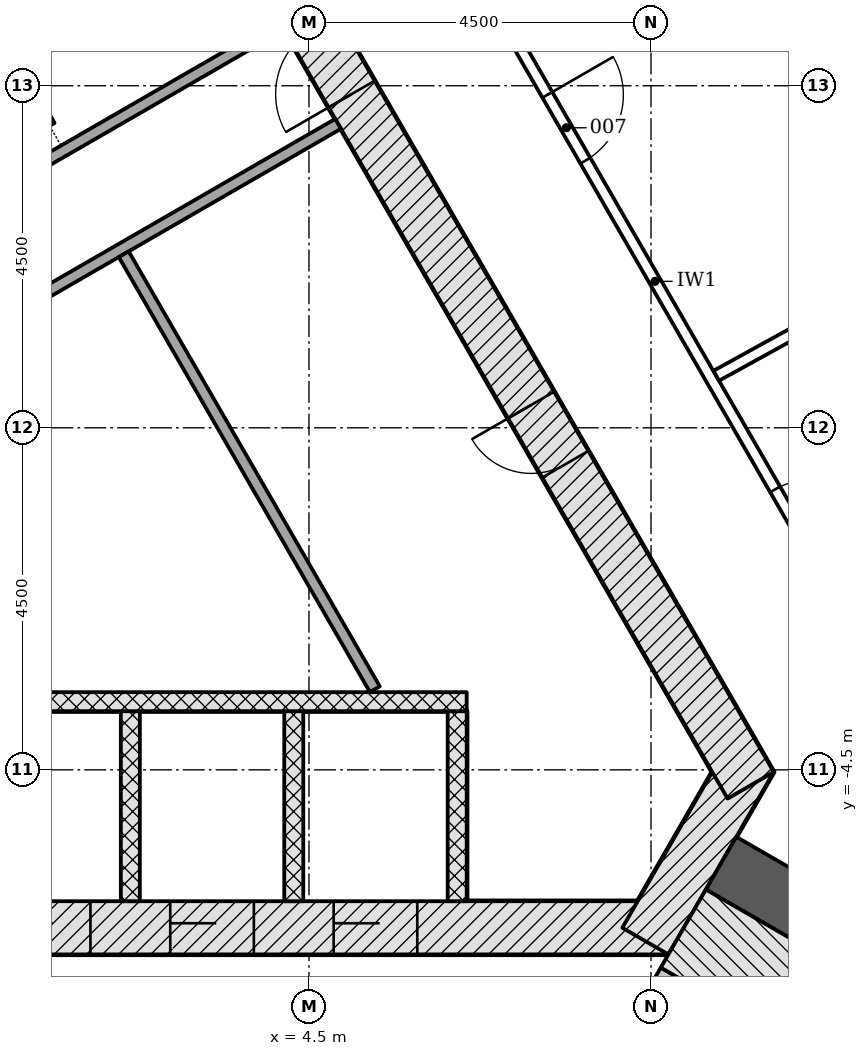
"""IFC4 building model, lengths in metres.
Left out: names, types, materials, properties, quantities, classifications, styles, units other than length and angle.
Written with IfcOpenShell. Run it as: python <this file> out.ifc"""

import sys

from ifc_helpers import new_model, si_unit, direction, frame, frame_2d, origin, place, context, subcontext, project, spatial, rectangle, extrude, element, fill, save


model = new_model("IFC4")
c1 = context("Model", 3, precision=1e-05, world=origin(), true_north=direction((0.0, 1.0)))
c2 = subcontext(c1, "Body", "Model", "MODEL_VIEW")
j1 = project(units=[si_unit("LENGTHUNIT", "METRE"), si_unit("PLANEANGLEUNIT", "RADIAN")], contexts=[c1])
p1 = place(None, origin())
s1 = spatial("IfcSite", under=j1, at=p1, CompositionType="ELEMENT")
p2 = place(p1, origin())
s2 = spatial("IfcBuilding", under=s1, at=p2, CompositionType="ELEMENT")
p3 = place(p2, frame((0.0, 0.0, 105.9)))
s3 = spatial("IfcBuildingStorey", under=s2, at=p3, CompositionType="ELEMENT", Elevation=105.9)
p4 = place(p3, frame((-9.229, -6.578, -0.2), z_axis=(0.0, 0.0, 1.0), x_axis=(1.0, 0.0, 0.0)))
e1 = element("IfcWall", 1, at=p4, inside=s3, PredefinedType="SHEAR", context=c2, shape_type="SweptSolid", body=[
    extrude(rectangle(XDim=18.458, YDim=0.7, at=frame_2d((9.229, 0.0))), origin(), (0.0, 0.0, 1.0), 3.6),
])
p5 = place(p4, frame((3.304, 0.0, 0.2)))
e2 = element("IfcOpeningElement", 2, at=p5, cuts=e1, PredefinedType="OPENING", context=c2, shape_type="SweptSolid", body=[
    extrude(rectangle(XDim=1.1, YDim=2.1, at=frame_2d((0.55, 1.05))), frame((0.0, 0.36, 0.0), z_axis=(0.0, -1.0, 0.0), x_axis=(1.0, 0.0, 0.0)), (0.0, 0.0, 1.0), 0.72),
])
p6 = place(p4, frame((5.454, 0.0, 0.2)))
e3 = element("IfcOpeningElement", 3, at=p6, cuts=e1, PredefinedType="OPENING", context=c2, shape_type="SweptSolid", body=[
    extrude(rectangle(XDim=1.1, YDim=2.1, at=frame_2d((0.55, 1.05))), frame((0.0, 0.36, 0.0), z_axis=(0.0, -1.0, 0.0), x_axis=(1.0, 0.0, 0.0)), (0.0, 0.0, 1.0), 0.72),
])
p7 = place(p4, frame((7.604, 0.0, 0.2)))
e4 = element("IfcOpeningElement", 4, at=p7, cuts=e1, PredefinedType="OPENING", context=c2, shape_type="SweptSolid", body=[
    extrude(rectangle(XDim=1.1, YDim=2.1, at=frame_2d((0.55, 1.05))), frame((0.0, 0.36, 0.0), z_axis=(0.0, -1.0, 0.0), x_axis=(1.0, 0.0, 0.0)), (0.0, 0.0, 1.0), 0.72),
])
p8 = place(p4, frame((9.754, 0.0, 0.2)))
e5 = element("IfcOpeningElement", 5, at=p8, cuts=e1, PredefinedType="OPENING", context=c2, shape_type="SweptSolid", body=[
    extrude(rectangle(XDim=1.1, YDim=2.1, at=frame_2d((0.55, 1.05))), frame((0.0, 0.36, 0.0), z_axis=(0.0, -1.0, 0.0), x_axis=(1.0, 0.0, 0.0)), (0.0, 0.0, 1.0), 0.72),
])
p9 = place(p4, frame((11.904, 0.0, 0.2)))
e6 = element("IfcOpeningElement", 6, at=p9, cuts=e1, PredefinedType="OPENING", context=c2, shape_type="SweptSolid", body=[
    extrude(rectangle(XDim=1.1, YDim=2.1, at=frame_2d((0.55, 1.05))), frame((0.0, 0.36, 0.0), z_axis=(0.0, -1.0, 0.0), x_axis=(1.0, 0.0, 0.0)), (0.0, 0.0, 1.0), 0.72),
])
p10 = place(p4, frame((14.054, 0.0, 0.2)))
e7 = element("IfcOpeningElement", 7, at=p10, cuts=e1, PredefinedType="OPENING", context=c2, shape_type="SweptSolid", body=[
    extrude(rectangle(XDim=1.1, YDim=2.1, at=frame_2d((0.55, 1.05))), frame((0.0, 0.36, 0.0), z_axis=(0.0, -1.0, 0.0), x_axis=(1.0, 0.0, 0.0)), (0.0, 0.0, 1.0), 0.72),
])
p11 = place(p4, frame((1.029, 0.0, 0.2)))
e8 = element("IfcOpeningElement", 8, at=p11, cuts=e1, PredefinedType="OPENING", context=c2, shape_type="SweptSolid", body=[
    extrude(rectangle(XDim=1.0, YDim=2.1, at=frame_2d((0.5, 1.05))), frame((0.0, 0.36, 0.0), z_axis=(0.0, -1.0, 0.0), x_axis=(1.0, 0.0, 0.0)), (0.0, 0.0, 1.0), 0.72),
])
p12 = place(p3, frame((8.926, -6.753, -0.2), z_axis=(0.0, 0.0, 1.0), x_axis=(0.500042739161, 0.866000726912, 0.0)))
e9 = element("IfcWall", 9, at=p12, inside=s3, PredefinedType="SHEAR", context=c2, shape_type="SweptSolid", body=[
    extrude(rectangle(XDim=2.771, YDim=0.7, at=frame_2d((1.386, 0.0))), origin(), (0.0, 0.0, 1.0), 3.6),
])
p13 = place(p3, frame((10.311, -4.703, -0.2), z_axis=(0.0, 0.0, 1.0), x_axis=(-0.500001446645, 0.866024568562, 0.0)))
e10 = element("IfcWall", 10, at=p13, inside=s3, PredefinedType="SHEAR", context=c2, shape_type="SweptSolid", body=[
    extrude(rectangle(XDim=18.458, YDim=0.7, at=frame_2d((9.229, 0.0))), origin(), (0.0, 0.0, 1.0), 3.6),
])
p14 = place(p13, frame((10.5, 0.0, 0.2)))
e11 = element("IfcOpeningElement", 11, at=p14, cuts=e10, PredefinedType="OPENING", context=c2, shape_type="SweptSolid", body=[
    extrude(rectangle(XDim=1.0, YDim=2.1, at=frame_2d((0.5, 1.05))), frame((0.0, 0.36, 0.0), z_axis=(0.0, -1.0, 0.0), x_axis=(1.0, 0.0, 0.0)), (0.0, 0.0, 1.0), 0.72),
])
p15 = place(p13, frame((4.877, 0.0, 0.2)))
e12 = element("IfcOpeningElement", 12, at=p15, cuts=e10, PredefinedType="OPENING", context=c2, shape_type="SweptSolid", body=[
    extrude(rectangle(XDim=0.9, YDim=2.1, at=frame_2d((0.45, 1.05))), frame((0.0, 0.36, 0.0), z_axis=(0.0, -1.0, 0.0), x_axis=(1.0, 0.0, 0.0)), (0.0, 0.0, 1.0), 0.72),
])
p16 = place(p13, frame((14.452, 0.0, 0.2)))
e13 = element("IfcOpeningElement", 13, at=p16, cuts=e10, PredefinedType="OPENING", context=c2, shape_type="SweptSolid", body=[
    extrude(rectangle(XDim=0.9, YDim=2.1, at=frame_2d((0.45, 1.05))), frame((0.0, 0.36, 0.0), z_axis=(0.0, -1.0, 0.0), x_axis=(1.0, 0.0, 0.0)), (0.0, 0.0, 1.0), 0.72),
])
p17 = place(p3, frame((9.922, -5.728, -0.2), z_axis=(0.0, 0.0, 1.0), x_axis=(0.866027307971, -0.499996701837, 0.0)))
e14 = element("IfcWall", 14, at=p17, inside=s3, PredefinedType="SHEAR", context=c2, shape_type="SweptSolid", body=[
    extrude(rectangle(XDim=11.918, YDim=0.8, at=frame_2d((5.959, 0.0))), origin(), (0.0, 0.0, 1.0), 3.6),
])
for number, where, z_axis, x_axis in (
    (15, (2.15, -6.228, -0.2), (0.0, 0.0, 1.0), (0.0, 1.0, 0.0)),
    (16, (4.3, -6.228, -0.2), (0.0, 0.0, 1.0), (0.0, 1.0, 0.0)),
    (17, (6.45, -6.228, -0.2), (0.0, 0.0, 1.0), (0.0, 1.0, 0.0)),
):
    element("IfcWall", number, at=place(p3, frame(where, z_axis=z_axis, x_axis=x_axis)), inside=s3, PredefinedType="PARTITIONING", context=c2, shape_type="SweptSolid", body=[
        extrude(rectangle(XDim=2.5, YDim=0.25, at=frame_2d((1.25, 0.0))), origin(), (0.0, 0.0, 1.0), 3.6),
    ])
p18 = place(p3, frame((-6.575, -3.603, 0.0), z_axis=(0.0, 0.0, 1.0), x_axis=(1.0, 0.0, 0.0)))
e18 = element("IfcWall", 18, at=p18, inside=s3, PredefinedType="PARTITIONING", context=c2, shape_type="SweptSolid", body=[
    extrude(rectangle(XDim=13.15, YDim=0.25, at=frame_2d((6.575, 0.0))), origin(), (0.0, 0.0, 1.0), 3.4),
])
p19 = place(p3, frame((-4.198, -1.244, 0.0), z_axis=(0.0, 0.0, 1.0), x_axis=(0.866020798945, 0.500007975732, 0.0)))
e19 = element("IfcWall", 19, at=p19, inside=s3, PredefinedType="PARTITIONING", context=c2, shape_type="SweptSolid", body=[
    extrude(rectangle(XDim=10.486, YDim=0.15, at=frame_2d((5.243, 0.0))), origin(), (0.0, 0.0, 1.0), 3.4),
])
p20 = place(p19, frame((3.736, 0.0, 0.0)))
e20 = element("IfcOpeningElement", 20, at=p20, cuts=e19, PredefinedType="OPENING", context=c2, shape_type="SweptSolid", body=[
    extrude(rectangle(XDim=0.9, YDim=2.1, at=frame_2d((0.45, 1.05))), frame((0.0, 0.085, 0.0), z_axis=(0.0, -1.0, 0.0), x_axis=(1.0, 0.0, 0.0)), (0.0, 0.0, 1.0), 0.17),
])
p21 = place(p19, frame((0.144, 0.0, 0.0)))
e21 = element("IfcOpeningElement", 21, at=p21, cuts=e19, PredefinedType="OPENING", context=c2, shape_type="SweptSolid", body=[
    extrude(rectangle(XDim=0.9, YDim=2.1, at=frame_2d((0.45, 1.05))), frame((0.0, 0.085, 0.0), z_axis=(0.0, -1.0, 0.0), x_axis=(1.0, 0.0, 0.0)), (0.0, 0.0, 1.0), 0.17),
])
p22 = place(p3, frame((5.367, -3.439, 0.0), z_axis=(0.0, 0.0, 1.0), x_axis=(-0.499981499682, 0.866036084685, 0.0)))
e22 = element("IfcWall", 22, at=p22, inside=s3, PredefinedType="PARTITIONING", context=c2, shape_type="SweptSolid", body=[
    extrude(rectangle(XDim=6.608, YDim=0.15, at=frame_2d((3.304, 0.0))), origin(), (0.0, 0.0, 1.0), 3.4),
])
p23 = place(p3, frame((-2.698, 1.354, 0.0), z_axis=(0.0, 0.0, 1.0), x_axis=(0.866021157486, 0.500007354732, 0.0)))
e23 = element("IfcWall", 23, at=p23, inside=s3, PredefinedType="PARTITIONING", context=c2, shape_type="SweptSolid", body=[
    extrude(rectangle(XDim=7.888, YDim=0.15, at=frame_2d((3.944, 0.0))), origin(), (0.0, 0.0, 1.0), 3.4),
])
p24 = place(p23, frame((1.845, 0.0, 0.0)))
e24 = element("IfcOpeningElement", 24, at=p24, cuts=e23, PredefinedType="OPENING", context=c2, shape_type="SweptSolid", body=[
    extrude(rectangle(XDim=0.9, YDim=2.1, at=frame_2d((0.45, 1.05))), frame((0.0, 0.085, 0.0), z_axis=(0.0, -1.0, 0.0), x_axis=(1.0, 0.0, 0.0)), (0.0, 0.0, 1.0), 0.17),
])
p25 = place(p3, frame((1.088, 3.972, 0.0), z_axis=(0.0, 0.0, 1.0), x_axis=(-0.500116913307, 0.865957893332, 0.0)))
e25 = element("IfcWall", 25, at=p25, inside=s3, PredefinedType="PARTITIONING", context=c2, shape_type="SweptSolid", body=[
    extrude(rectangle(XDim=2.304, YDim=0.15, at=frame_2d((1.152, 0.0))), origin(), (0.0, 0.0, 1.0), 3.4),
])
p26 = place(p3, frame((7.44, -10.226, -0.2), z_axis=(0.0, 0.0, 1.0), x_axis=(0.500022077904, 0.866012656725, 0.0)))
e26 = element("IfcWall", 26, at=p26, inside=s3, PredefinedType="SHEAR", context=c2, shape_type="SweptSolid", body=[
    extrude(rectangle(XDim=3.55, YDim=0.2, at=frame_2d((1.775, 0.0))), origin(), (0.0, 0.0, 1.0), 3.6),
])
p27 = place(p26, frame((1.175, 0.0, 0.2)))
e27 = element("IfcOpeningElement", 27, at=p27, cuts=e26, PredefinedType="OPENING", context=c2, shape_type="SweptSolid", body=[
    extrude(rectangle(XDim=1.2, YDim=2.1, at=frame_2d((0.6, 1.05))), frame((0.0, 0.11, 0.0), z_axis=(0.0, -1.0, 0.0), x_axis=(1.0, 0.0, 0.0)), (0.0, 0.0, 1.0), 0.22),
])
p28 = place(p3, frame((9.425, -6.588, -0.2), z_axis=(0.0, 0.0, 1.0), x_axis=(0.866018442252, -0.500012057535, 0.0)))
e28 = element("IfcWall", 28, at=p28, inside=s3, PredefinedType="SHEAR", context=c2, shape_type="SweptSolid", body=[
    extrude(rectangle(XDim=7.2, YDim=1.186, at=frame_2d((3.6, 0.0))), origin(), (0.0, 0.0, 1.0), 3.6),
])
p29 = place(p3, frame((5.289, 8.446, 0.0), z_axis=(0.0, 0.0, 1.0), x_axis=(0.499996620721, -0.866027354803, 0.0)))
e29 = element("IfcWall", 29, at=p29, inside=s3, PredefinedType="PARTITIONING", context=c2, shape_type="SweptSolid", body=[
    extrude(rectangle(XDim=15.057, YDim=0.15, at=frame_2d((7.528, 0.0))), origin(), (0.0, 0.0, 1.0), 2.847),
])
p30 = place(p29, frame((10.689, 0.0, 0.0)))
e30 = element("IfcOpeningElement", 30, at=p30, cuts=e29, PredefinedType="OPENING", context=c2, shape_type="SweptSolid", body=[
    extrude(rectangle(XDim=1.0, YDim=2.1, at=frame_2d((0.5, 1.05))), frame((0.0, 0.085, 0.0), z_axis=(0.0, -1.0, 0.0), x_axis=(1.0, 0.0, 0.0)), (0.0, 0.0, 1.0), 0.17),
])
p31 = place(p29, frame((4.695, 0.0, 0.0)))
e31 = element("IfcOpeningElement", 31, at=p31, cuts=e29, PredefinedType="OPENING", context=c2, shape_type="SweptSolid", body=[
    extrude(rectangle(XDim=1.0, YDim=2.1, at=frame_2d((0.5, 1.05))), frame((0.0, 0.085, 0.0), z_axis=(0.0, -1.0, 0.0), x_axis=(1.0, 0.0, 0.0)), (0.0, 0.0, 1.0), 0.17),
])
p32 = place(p3, frame((16.297, 4.232, 0.0), z_axis=(0.0, 0.0, 1.0), x_axis=(-0.875895262359, -0.482501284327, 0.0)))
e32 = element("IfcWall", 32, at=p32, inside=s3, PredefinedType="PARTITIONING", context=c2, shape_type="SweptSolid", body=[
    extrude(rectangle(XDim=7.351, YDim=0.15, at=frame_2d((3.676, 0.0))), origin(), (0.0, 0.0, 1.0), 2.847),
])
p33 = place(p8, origin())
e33 = element("IfcDoor", 33, at=p33, inside=s3, OperationType="DOUBLE_DOOR_SLIDING", PredefinedType="DOOR", context=c2, shape_type="SweptSolid", body=[
    extrude(rectangle(XDim=1.1, YDim=2.1, at=frame_2d((0.55, 1.05))), frame((0.0, 0.025, 0.0), z_axis=(0.0, -1.0, 0.0), x_axis=(1.0, 0.0, 0.0)), (0.0, 0.0, 1.0), 0.05),
])
fill(e5, e33)
p34 = place(p9, origin())
e34 = element("IfcDoor", 34, at=p34, inside=s3, OperationType="DOUBLE_DOOR_SLIDING", PredefinedType="DOOR", context=c2, shape_type="SweptSolid", body=[
    extrude(rectangle(XDim=1.1, YDim=2.1, at=frame_2d((0.55, 1.05))), frame((0.0, 0.025, 0.0), z_axis=(0.0, -1.0, 0.0), x_axis=(1.0, 0.0, 0.0)), (0.0, 0.0, 1.0), 0.05),
])
fill(e6, e34)
p35 = place(p10, origin())
e35 = element("IfcDoor", 35, at=p35, inside=s3, OperationType="DOUBLE_DOOR_SLIDING", PredefinedType="DOOR", context=c2, shape_type="SweptSolid", body=[
    extrude(rectangle(XDim=1.1, YDim=2.1, at=frame_2d((0.55, 1.05))), frame((0.0, 0.025, 0.0), z_axis=(0.0, -1.0, 0.0), x_axis=(1.0, 0.0, 0.0)), (0.0, 0.0, 1.0), 0.05),
])
fill(e7, e35)
p36 = place(p14, origin())
e36 = element("IfcDoor", 36, at=p36, inside=s3, OperationType="SINGLE_SWING_LEFT", PredefinedType="DOOR", context=c2, shape_type="SweptSolid", body=[
    extrude(rectangle(XDim=1.0, YDim=2.1, at=frame_2d((0.5, 1.05))), frame((0.0, 0.075, 0.0), z_axis=(0.0, -1.0, 0.0), x_axis=(1.0, 0.0, 0.0)), (0.0, 0.0, 1.0), 0.15),
])
fill(e11, e36)
p37 = place(p15, origin())
e37 = element("IfcDoor", 37, at=p37, inside=s3, OperationType="SINGLE_SWING_RIGHT", PredefinedType="DOOR", context=c2, shape_type="SweptSolid", body=[
    extrude(rectangle(XDim=0.9, YDim=2.1, at=frame_2d((0.45, 1.05))), frame((0.0, 0.075, 0.0), z_axis=(0.0, -1.0, 0.0), x_axis=(1.0, 0.0, 0.0)), (0.0, 0.0, 1.0), 0.15),
])
fill(e12, e37)
p38 = place(p30, origin())
e38 = element("IfcDoor", 38, at=p38, inside=s3, OperationType="SINGLE_SWING_RIGHT", PredefinedType="DOOR", context=c2, shape_type="SweptSolid", body=[
    extrude(rectangle(XDim=1.0, YDim=2.1, at=frame_2d((0.5, 1.05))), frame((0.0, 0.025, 0.0), z_axis=(0.0, -1.0, 0.0), x_axis=(1.0, 0.0, 0.0)), (0.0, 0.0, 1.0), 0.05),
])
fill(e30, e38)
p39 = place(p31, origin())
e39 = element("IfcDoor", 39, at=p39, inside=s3, OperationType="SINGLE_SWING_LEFT", PredefinedType="DOOR", context=c2, shape_type="SweptSolid", body=[
    extrude(rectangle(XDim=1.0, YDim=2.1, at=frame_2d((0.5, 1.05))), frame((0.0, 0.025, 0.0), z_axis=(0.0, -1.0, 0.0), x_axis=(1.0, 0.0, 0.0)), (0.0, 0.0, 1.0), 0.05),
])
fill(e31, e39)
save(model, sys.argv[1])
